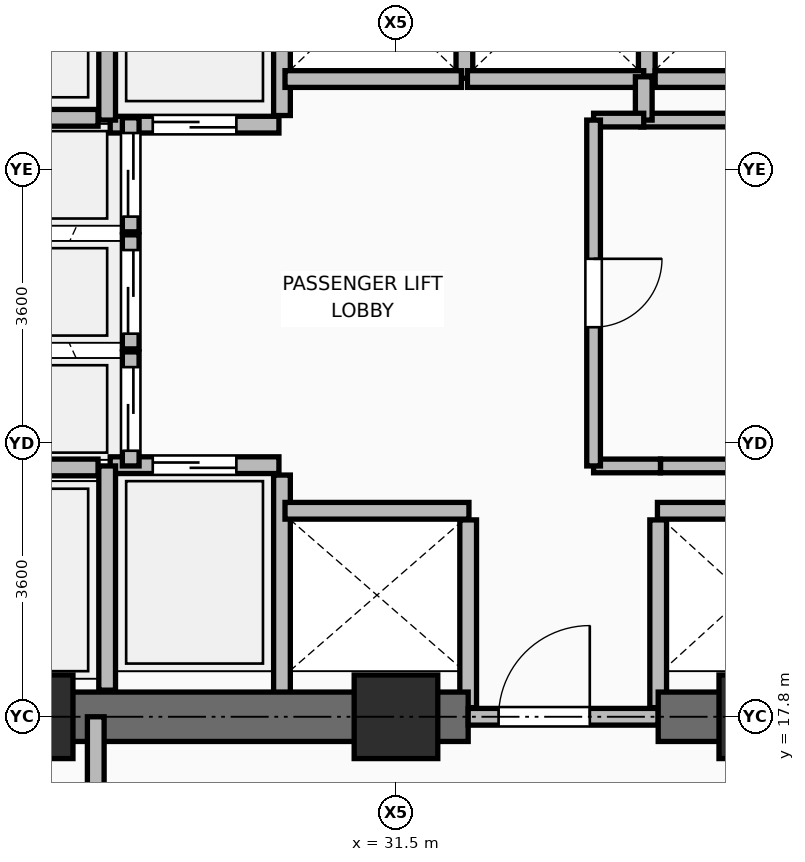
"""IFC4 building model, lengths in metres.
Left out: names, types, materials, properties, quantities, classifications, styles, units other than length and angle.
Written with IfcOpenShell. Run it as: python <this file> out.ifc"""

import sys

from ifc_helpers import new_model, si_unit, direction, frame, frame_2d, origin, origin_2d, place, context, subcontext, project, spatial, rectangle, extrude, element, fill, save


model = new_model("IFC4")
c1 = context("Model", 3, precision=1e-05, world=origin(), true_north=direction((0.0, 1.0)))
c2 = subcontext(c1, "Body", "Model", "MODEL_VIEW")
j1 = project(units=[si_unit("LENGTHUNIT", "METRE"), si_unit("PLANEANGLEUNIT", "RADIAN")], contexts=[c1])
p1 = place(None, origin())
s1 = spatial("IfcSite", under=j1, at=p1, CompositionType="ELEMENT")
p2 = place(p1, origin())
s2 = spatial("IfcBuilding", under=s1, at=p2, CompositionType="ELEMENT")
p3 = place(p2, frame((0.0, 0.0, 87.0)))
s3 = spatial("IfcBuildingStorey", under=s2, at=p3, CompositionType="ELEMENT", Elevation=87.0)
for number, where, z_axis, x_axis in (
    (1, (26.7, 17.8, 0.0), (0.0, 0.0, 1.0), (1.0, 0.0, 0.0)),
    (2, (31.5, 17.8, 0.0), (0.0, 0.0, 1.0), (1.0, 0.0, 0.0)),
    (3, (36.3, 17.8, 0.0), (0.0, 0.0, 1.0), (1.0, 0.0, 0.0)),
):
    element("IfcColumn", number, at=place(p3, frame(where, z_axis=z_axis, x_axis=x_axis)), inside=s3, PredefinedType="COLUMN", context=c2, shape_type="SweptSolid", body=[
        extrude(rectangle(XDim=1.1, YDim=1.1, at=origin_2d()), origin(), (0.0, 0.0, 1.0), 3.75),
    ])
p4 = place(p3, frame((30.0, 18.08, 0.0), z_axis=(0.0, 0.0, 1.0), x_axis=(0.0, 1.0, 0.0)))
e4 = element("IfcWall", 4, at=p4, inside=s3, PredefinedType="PARTITIONING", context=c2, shape_type="SweptSolid", body=[
    extrude(rectangle(XDim=2.9, YDim=0.22, at=frame_2d((1.45, 0.0))), origin(), (0.0, 0.0, 1.0), 3.475),
])
for number, where, z_axis, x_axis in (
    (5, (32.45, 17.92, 0.0), (0.0, 0.0, 1.0), (0.0, 1.0, 0.0)),
    (6, (34.95, 17.92, 0.0), (0.0, 0.0, 1.0), (0.0, 1.0, 0.0)),
):
    element("IfcWall", number, at=place(p3, frame(where, z_axis=z_axis, x_axis=x_axis)), inside=s3, PredefinedType="PARTITIONING", context=c2, shape_type="SweptSolid", body=[
        extrude(rectangle(XDim=2.47, YDim=0.22, at=frame_2d((1.235, 0.0))), origin(), (0.0, 0.0, 1.0), 2.858),
    ])
p5 = place(p3, frame((30.0, 25.71, 0.0), z_axis=(0.0, 0.0, 1.0), x_axis=(0.0, 1.0, 0.0)))
e7 = element("IfcWall", 7, at=p5, inside=s3, PredefinedType="PARTITIONING", context=c2, shape_type="SweptSolid", body=[
    extrude(rectangle(XDim=2.73, YDim=0.22, at=frame_2d((1.365, 0.0))), origin(), (0.0, 0.0, 1.0), 3.475),
])
p6 = place(p3, frame((32.4, 26.2, 0.0), z_axis=(0.0, 0.0, 1.0), x_axis=(0.0, 1.0, 0.0)))
e8 = element("IfcWall", 8, at=p6, inside=s3, PredefinedType="PARTITIONING", context=c2, shape_type="SweptSolid", body=[
    extrude(rectangle(XDim=2.24, YDim=0.22, at=frame_2d((1.12, 0.0))), origin(), (0.0, 0.0, 1.0), 3.475),
])
p7 = place(p3, frame((34.8, 26.23, 0.0), z_axis=(0.0, 0.0, 1.0), x_axis=(0.0, 1.0, 0.0)))
e9 = element("IfcWall", 9, at=p7, inside=s3, PredefinedType="PARTITIONING", context=c2, shape_type="SweptSolid", body=[
    extrude(rectangle(XDim=2.21, YDim=0.22, at=frame_2d((1.105, 0.0))), origin(), (0.0, 0.0, 1.0), 3.475),
])
p8 = place(p3, frame((34.91, 26.19, 0.0), z_axis=(0.0, 0.0, 1.0), x_axis=(1.0, 0.0, 0.0)))
e10 = element("IfcWall", 10, at=p8, inside=s3, PredefinedType="PARTITIONING", context=c2, shape_type="SweptSolid", body=[
    extrude(rectangle(XDim=2.14, YDim=0.22, at=frame_2d((1.07, 0.0))), origin(), (0.0, 0.0, 1.0), 3.475),
])
p9 = place(p3, frame((25.55, 17.8, 0.0), z_axis=(0.0, 0.0, 1.0), x_axis=(1.0, 0.0, 0.0)))
e11 = element("IfcWall", 11, at=p9, inside=s3, PredefinedType="SHEAR", context=c2, shape_type="SweptSolid", body=[
    extrude(rectangle(XDim=6.9, YDim=0.65, at=frame_2d((3.45, 0.0))), origin(), (0.0, 0.0, 1.0), 3.5),
])
p10 = place(p3, frame((32.45, 17.8, 0.0), z_axis=(0.0, 0.0, 1.0), x_axis=(1.0, 0.0, 0.0)))
e12 = element("IfcWall", 12, at=p10, inside=s3, PredefinedType="PARTITIONING", context=c2, shape_type="SweptSolid", body=[
    extrude(rectangle(XDim=2.5, YDim=0.22, at=frame_2d((1.25, 0.0))), origin(), (0.0, 0.0, 1.0), 2.858),
])
p11 = place(p10, frame((0.4, 0.0, 0.0)))
e13 = element("IfcOpeningElement", 13, at=p11, cuts=e12, PredefinedType="OPENING", context=c2, shape_type="SweptSolid", body=[
    extrude(rectangle(XDim=1.2, YDim=2.1, at=frame_2d((0.6, 1.05))), frame((0.0, 0.12, 0.0), z_axis=(0.0, -1.0, 0.0), x_axis=(1.0, 0.0, 0.0)), (0.0, 0.0, 1.0), 0.24),
])
p12 = place(p3, frame((34.95, 17.8, 0.0), z_axis=(0.0, 0.0, 1.0), x_axis=(1.0, 0.0, 0.0)))
e14 = element("IfcWall", 14, at=p12, inside=s3, PredefinedType="SHEAR", context=c2, shape_type="SweptSolid", body=[
    extrude(rectangle(XDim=6.475, YDim=0.65, at=frame_2d((3.238, 0.0))), origin(), (0.0, 0.0, 1.0), 3.5),
])
p13 = place(p3, frame((27.74, 21.11, 0.0), z_axis=(0.0, 0.0, 1.0), x_axis=(1.0, 0.0, 0.0)))
e15 = element("IfcWall", 15, at=p13, inside=s3, PredefinedType="PARTITIONING", context=c2, shape_type="SweptSolid", body=[
    extrude(rectangle(XDim=2.22, YDim=0.22, at=frame_2d((1.11, 0.0))), origin(), (0.0, 0.0, 1.0), 3.48),
])
p14 = place(p13, frame((0.56, 0.0, 0.0)))
e16 = element("IfcOpeningElement", 16, at=p14, cuts=e15, PredefinedType="OPENING", context=c2, shape_type="SweptSolid", body=[
    extrude(rectangle(XDim=1.1, YDim=2.2, at=frame_2d((0.55, 1.1))), frame((0.0, 0.12, 0.0), z_axis=(0.0, -1.0, 0.0), x_axis=(1.0, 0.0, 0.0)), (0.0, 0.0, 1.0), 0.24),
])
p15 = place(p3, frame((27.74, 25.59, 0.0), z_axis=(0.0, 0.0, 1.0), x_axis=(1.0, 0.0, 0.0)))
e17 = element("IfcWall", 17, at=p15, inside=s3, PredefinedType="PARTITIONING", context=c2, shape_type="SweptSolid", body=[
    extrude(rectangle(XDim=2.22, YDim=0.22, at=frame_2d((1.11, 0.0))), origin(), (0.0, 0.0, 1.0), 3.48),
])
p16 = place(p15, frame((0.56, 0.0, 0.0)))
e18 = element("IfcOpeningElement", 18, at=p16, cuts=e17, PredefinedType="OPENING", context=c2, shape_type="SweptSolid", body=[
    extrude(rectangle(XDim=1.1, YDim=2.2, at=frame_2d((0.55, 1.1))), frame((0.0, 0.12, 0.0), z_axis=(0.0, -1.0, 0.0), x_axis=(1.0, 0.0, 0.0)), (0.0, 0.0, 1.0), 0.24),
])
p17 = place(p3, frame((30.04, 20.51, 0.0), z_axis=(0.0, 0.0, 1.0), x_axis=(1.0, 0.0, 0.0)))
e19 = element("IfcWall", 19, at=p17, inside=s3, PredefinedType="PARTITIONING", context=c2, shape_type="SweptSolid", body=[
    extrude(rectangle(XDim=2.42, YDim=0.22, at=frame_2d((1.21, 0.0))), origin(), (0.0, 0.0, 1.0), 3.48),
])
p18 = place(p3, frame((34.94, 20.51, 0.0), z_axis=(0.0, 0.0, 1.0), x_axis=(1.0, 0.0, 0.0)))
e20 = element("IfcWall", 20, at=p18, inside=s3, PredefinedType="PARTITIONING", context=c2, shape_type="SweptSolid", body=[
    extrude(rectangle(XDim=2.24, YDim=0.22, at=frame_2d((1.12, 0.0))), origin(), (0.0, 0.0, 1.0), 3.48),
])
for number, where, z_axis, x_axis in (
    (21, (30.04, 26.19, 0.0), (0.0, 0.0, 1.0), (1.0, 0.0, 0.0)),
    (22, (32.44, 26.19, 0.0), (0.0, 0.0, 1.0), (1.0, 0.0, 0.0)),
):
    element("IfcWall", number, at=place(p3, frame(where, z_axis=z_axis, x_axis=x_axis)), inside=s3, PredefinedType="PARTITIONING", context=c2, shape_type="SweptSolid", body=[
        extrude(rectangle(XDim=2.32, YDim=0.22, at=frame_2d((1.16, 0.0))), origin(), (0.0, 0.0, 1.0), 3.48),
    ])
p19 = place(p3, frame((28.01, 21.1, 0.0), z_axis=(0.0, 0.0, 1.0), x_axis=(0.0, 1.0, 0.0)))
e23 = element("IfcWall", 23, at=p19, inside=s3, PredefinedType="PARTITIONING", context=c2, shape_type="SweptSolid", body=[
    extrude(rectangle(XDim=1.5, YDim=0.22, at=frame_2d((0.75, 0.0))), origin(), (0.0, 0.0, 1.0), 3.48),
])
p20 = place(p19, frame((0.2, 0.0, 0.0)))
e24 = element("IfcOpeningElement", 24, at=p20, cuts=e23, PredefinedType="OPENING", context=c2, shape_type="SweptSolid", body=[
    extrude(rectangle(XDim=1.1, YDim=2.2, at=frame_2d((0.55, 1.1))), frame((0.0, 0.12, 0.0), z_axis=(0.0, -1.0, 0.0), x_axis=(1.0, 0.0, 0.0)), (0.0, 0.0, 1.0), 0.24),
])
p21 = place(p3, frame((28.01, 22.64, 0.0), z_axis=(0.0, 0.0, 1.0), x_axis=(0.0, 1.0, 0.0)))
e25 = element("IfcWall", 25, at=p21, inside=s3, PredefinedType="PARTITIONING", context=c2, shape_type="SweptSolid", body=[
    extrude(rectangle(XDim=1.5, YDim=0.22, at=frame_2d((0.75, 0.0))), origin(), (0.0, 0.0, 1.0), 3.48),
])
p22 = place(p21, frame((0.2, 0.0, 0.0)))
e26 = element("IfcOpeningElement", 26, at=p22, cuts=e25, PredefinedType="OPENING", context=c2, shape_type="SweptSolid", body=[
    extrude(rectangle(XDim=1.1, YDim=2.2, at=frame_2d((0.55, 1.1))), frame((0.0, 0.12, 0.0), z_axis=(0.0, -1.0, 0.0), x_axis=(1.0, 0.0, 0.0)), (0.0, 0.0, 1.0), 0.24),
])
p23 = place(p3, frame((28.01, 24.18, 0.0), z_axis=(0.0, 0.0, 1.0), x_axis=(0.0, 1.0, 0.0)))
e27 = element("IfcWall", 27, at=p23, inside=s3, PredefinedType="PARTITIONING", context=c2, shape_type="SweptSolid", body=[
    extrude(rectangle(XDim=1.5, YDim=0.22, at=frame_2d((0.75, 0.0))), origin(), (0.0, 0.0, 1.0), 3.48),
])
p24 = place(p23, frame((0.2, 0.0, 0.0)))
e28 = element("IfcOpeningElement", 28, at=p24, cuts=e27, PredefinedType="OPENING", context=c2, shape_type="SweptSolid", body=[
    extrude(rectangle(XDim=1.1, YDim=2.2, at=frame_2d((0.55, 1.1))), frame((0.0, 0.12, 0.0), z_axis=(0.0, -1.0, 0.0), x_axis=(1.0, 0.0, 0.0)), (0.0, 0.0, 1.0), 0.24),
])
p25 = place(p3, frame((27.7, 18.15, 0.0), z_axis=(0.0, 0.0, 1.0), x_axis=(0.0, 1.0, 0.0)))
e29 = element("IfcWall", 29, at=p25, inside=s3, PredefinedType="PARTITIONING", context=c2, shape_type="SweptSolid", body=[
    extrude(rectangle(XDim=2.95, YDim=0.22, at=frame_2d((1.475, 0.0))), origin(), (0.0, 0.0, 1.0), 3.48),
])
p26 = place(p3, frame((27.7, 25.65, 0.0), z_axis=(0.0, 0.0, 1.0), x_axis=(0.0, 1.0, 0.0)))
e30 = element("IfcWall", 30, at=p26, inside=s3, PredefinedType="PARTITIONING", context=c2, shape_type="SweptSolid", body=[
    extrude(rectangle(XDim=3.0, YDim=0.22, at=frame_2d((1.5, 0.0))), origin(), (0.0, 0.0, 1.0), 3.48),
])
for number, where, z_axis, x_axis in (
    (31, (25.88, 21.08, 0.0), (0.0, 0.0, 1.0), (1.0, 0.0, 0.0)),
    (32, (25.88, 25.68, 0.0), (0.0, 0.0, 1.0), (1.0, 0.0, 0.0)),
):
    element("IfcWall", number, at=place(p3, frame(where, z_axis=z_axis, x_axis=x_axis)), inside=s3, PredefinedType="PARTITIONING", context=c2, shape_type="SweptSolid", body=[
        extrude(rectangle(XDim=1.7, YDim=0.22, at=frame_2d((0.85, 0.0))), origin(), (0.0, 0.0, 1.0), 3.48),
    ])
p27 = place(p3, frame((34.98, 21.1, 0.0), z_axis=(0.0, 0.0, 1.0), x_axis=(1.0, 0.0, 0.0)))
e33 = element("IfcWall", 33, at=p27, inside=s3, PredefinedType="PARTITIONING", context=c2, shape_type="SweptSolid", body=[
    extrude(rectangle(XDim=2.08, YDim=0.18, at=frame_2d((1.04, 0.0))), origin(), (0.0, 0.0, 1.0), 3.48),
])
p28 = place(p3, frame((34.72, 25.65, 0.0), z_axis=(0.0, 0.0, 1.0), x_axis=(1.0, 0.0, 0.0)))
e34 = element("IfcWall", 34, at=p28, inside=s3, PredefinedType="PARTITIONING", context=c2, shape_type="SweptSolid", body=[
    extrude(rectangle(XDim=2.34, YDim=0.18, at=frame_2d((1.17, 0.0))), origin(), (0.0, 0.0, 1.0), 3.48),
])
p29 = place(p3, frame((34.76, 25.65, 0.0), z_axis=(0.0, 0.0, 1.0), x_axis=(0.0, 1.0, 0.0)))
e35 = element("IfcWall", 35, at=p29, inside=s3, PredefinedType="PARTITIONING", context=c2, shape_type="SweptSolid", body=[
    extrude(rectangle(XDim=0.57, YDim=0.22, at=frame_2d((0.285, 0.0))), origin(), (0.0, 0.0, 1.0), 3.48),
])
p30 = place(p3, frame((34.1, 21.1, 0.0), z_axis=(0.0, 0.0, 1.0), x_axis=(1.0, 0.0, 0.0)))
e36 = element("IfcWall", 36, at=p30, inside=s3, PredefinedType="PARTITIONING", context=c2, shape_type="SweptSolid", body=[
    extrude(rectangle(XDim=0.88, YDim=0.18, at=frame_2d((0.44, 0.0))), origin(), (0.0, 0.0, 1.0), 3.48),
])
p31 = place(p3, frame((34.1, 25.65, 0.0), z_axis=(0.0, 0.0, 1.0), x_axis=(1.0, 0.0, 0.0)))
e37 = element("IfcWall", 37, at=p31, inside=s3, PredefinedType="PARTITIONING", context=c2, shape_type="SweptSolid", body=[
    extrude(rectangle(XDim=0.66, YDim=0.18, at=frame_2d((0.33, 0.0))), origin(), (0.0, 0.0, 1.0), 3.48),
])
p32 = place(p3, frame((34.1, 21.1, 0.0), z_axis=(0.0, 0.0, 1.0), x_axis=(0.0, 1.0, 0.0)))
e38 = element("IfcWall", 38, at=p32, inside=s3, PredefinedType="PARTITIONING", context=c2, shape_type="SweptSolid", body=[
    extrude(rectangle(XDim=4.55, YDim=0.18, at=frame_2d((2.275, 0.0))), origin(), (0.0, 0.0, 1.0), 3.48),
])
p33 = place(p32, frame((1.825, 0.0, 0.0)))
e39 = element("IfcOpeningElement", 39, at=p33, cuts=e38, PredefinedType="OPENING", context=c2, shape_type="SweptSolid", body=[
    extrude(rectangle(XDim=0.9, YDim=2.1, at=frame_2d((0.45, 1.05))), frame((0.0, 0.1, 0.0), z_axis=(0.0, -1.0, 0.0), x_axis=(1.0, 0.0, 0.0)), (0.0, 0.0, 1.0), 0.2),
])
p34 = place(p3, frame((27.55, 14.35, 0.0), z_axis=(0.0, 0.0, 1.0), x_axis=(0.0, 1.0, 0.0)))
e40 = element("IfcWall", 40, at=p34, inside=s3, PredefinedType="PARTITIONING", context=c2, shape_type="SweptSolid", body=[
    extrude(rectangle(XDim=3.45, YDim=0.22, at=frame_2d((1.725, 0.0))), origin(), (0.0, 0.0, 1.0), 2.858),
])
p35 = place(p34, frame((1.175, 0.0, 0.0)))
e41 = element("IfcOpeningElement", 41, at=p35, cuts=e40, PredefinedType="OPENING", context=c2, shape_type="SweptSolid", body=[
    extrude(rectangle(XDim=1.1, YDim=2.1, at=frame_2d((0.55, 1.05))), frame((0.0, 0.12, 0.0), z_axis=(0.0, -1.0, 0.0), x_axis=(1.0, 0.0, 0.0)), (0.0, 0.0, 1.0), 0.24),
])
p36 = place(p11, origin())
e42 = element("IfcDoor", 42, at=p36, inside=s3, OperationType="SINGLE_SWING_RIGHT", PredefinedType="DOOR", context=c2, shape_type="SweptSolid", body=[
    extrude(rectangle(XDim=1.2, YDim=2.1, at=frame_2d((0.6, 1.05))), frame((0.0, 0.025, 0.0), z_axis=(0.0, -1.0, 0.0), x_axis=(1.0, 0.0, 0.0)), (0.0, 0.0, 1.0), 0.05),
])
fill(e13, e42)
p37 = place(p14, origin())
e43 = element("IfcDoor", 43, at=p37, inside=s3, OperationType="DOUBLE_DOOR_SLIDING", PredefinedType="DOOR", context=c2, shape_type="SweptSolid", body=[
    extrude(rectangle(XDim=1.1, YDim=2.2, at=frame_2d((0.55, 1.1))), frame((0.0, 0.025, 0.0), z_axis=(0.0, -1.0, 0.0), x_axis=(1.0, 0.0, 0.0)), (0.0, 0.0, 1.0), 0.05),
])
fill(e16, e43)
p38 = place(p16, frame((1.1, 0.0, 0.0), z_axis=(0.0, 0.0, 1.0), x_axis=(-1.0, 0.0, 0.0)))
e44 = element("IfcDoor", 44, at=p38, inside=s3, OperationType="DOUBLE_DOOR_SLIDING", PredefinedType="DOOR", context=c2, shape_type="SweptSolid", body=[
    extrude(rectangle(XDim=1.1, YDim=2.2, at=frame_2d((0.55, 1.1))), frame((0.0, 0.025, 0.0), z_axis=(0.0, -1.0, 0.0), x_axis=(1.0, 0.0, 0.0)), (0.0, 0.0, 1.0), 0.05),
])
fill(e18, e44)
p39 = place(p20, frame((1.1, 0.0, 0.0), z_axis=(0.0, 0.0, 1.0), x_axis=(-1.0, 0.0, 0.0)))
e45 = element("IfcDoor", 45, at=p39, inside=s3, OperationType="DOUBLE_DOOR_SLIDING", PredefinedType="DOOR", context=c2, shape_type="SweptSolid", body=[
    extrude(rectangle(XDim=1.1, YDim=2.2, at=frame_2d((0.55, 1.1))), frame((0.0, 0.025, 0.0), z_axis=(0.0, -1.0, 0.0), x_axis=(1.0, 0.0, 0.0)), (0.0, 0.0, 1.0), 0.05),
])
fill(e24, e45)
p40 = place(p22, frame((1.1, 0.0, 0.0), z_axis=(0.0, 0.0, 1.0), x_axis=(-1.0, 0.0, 0.0)))
e46 = element("IfcDoor", 46, at=p40, inside=s3, OperationType="DOUBLE_DOOR_SLIDING", PredefinedType="DOOR", context=c2, shape_type="SweptSolid", body=[
    extrude(rectangle(XDim=1.1, YDim=2.2, at=frame_2d((0.55, 1.1))), frame((0.0, 0.025, 0.0), z_axis=(0.0, -1.0, 0.0), x_axis=(1.0, 0.0, 0.0)), (0.0, 0.0, 1.0), 0.05),
])
fill(e26, e46)
p41 = place(p24, frame((1.1, 0.0, 0.0), z_axis=(0.0, 0.0, 1.0), x_axis=(-1.0, 0.0, 0.0)))
e47 = element("IfcDoor", 47, at=p41, inside=s3, OperationType="DOUBLE_DOOR_SLIDING", PredefinedType="DOOR", context=c2, shape_type="SweptSolid", body=[
    extrude(rectangle(XDim=1.1, YDim=2.2, at=frame_2d((0.55, 1.1))), frame((0.0, 0.025, 0.0), z_axis=(0.0, -1.0, 0.0), x_axis=(1.0, 0.0, 0.0)), (0.0, 0.0, 1.0), 0.05),
])
fill(e28, e47)
p42 = place(p33, frame((0.9, 0.0, 0.0), z_axis=(0.0, 0.0, 1.0), x_axis=(-1.0, 0.0, 0.0)))
e48 = element("IfcDoor", 48, at=p42, inside=s3, OperationType="SINGLE_SWING_LEFT", PredefinedType="DOOR", context=c2, shape_type="SweptSolid", body=[
    extrude(rectangle(XDim=0.9, YDim=2.1, at=frame_2d((0.45, 1.05))), frame((0.0, 0.025, 0.0), z_axis=(0.0, -1.0, 0.0), x_axis=(1.0, 0.0, 0.0)), (0.0, 0.0, 1.0), 0.05),
])
fill(e39, e48)
save(model, sys.argv[1])
